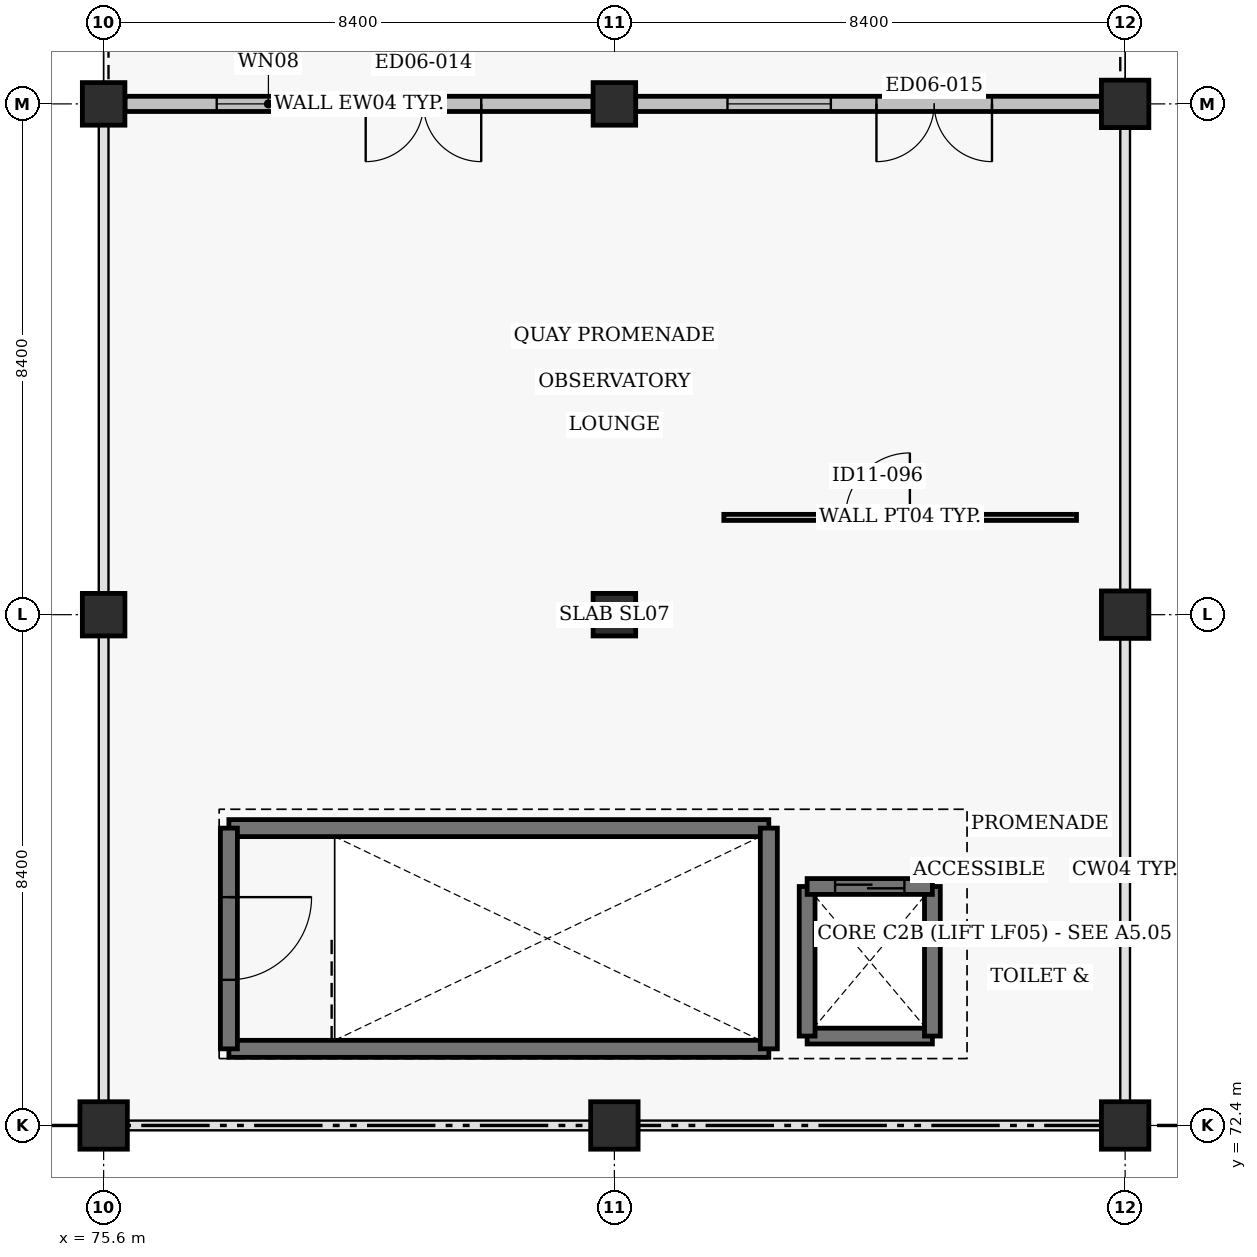
"""IFC4 building model, lengths in metres.
Left out: names, types, materials, properties, quantities, classifications, styles, units other than length and angle.
Written with IfcOpenShell. Run it as: python <this file> out.ifc"""

import sys

from ifc_helpers import new_model, si_unit, direction, frame, frame_2d, origin, origin_2d, place, context, subcontext, project, spatial, rectangle, circle, extrude, element, fill, save


model = new_model("IFC4")
c1 = context("Model", 3, precision=1e-05, world=origin(), true_north=direction((0.0, 1.0)))
c2 = subcontext(c1, "Body", "Model", "MODEL_VIEW")
j1 = project(units=[si_unit("LENGTHUNIT", "METRE"), si_unit("PLANEANGLEUNIT", "RADIAN")], contexts=[c1])
p1 = place(None, origin())
s1 = spatial("IfcSite", under=j1, at=p1, CompositionType="ELEMENT")
p2 = place(p1, origin())
s2 = spatial("IfcBuilding", under=s1, at=p2, CompositionType="ELEMENT")
p3 = place(p2, frame((0.0, 0.0, 9.6)))
s3 = spatial("IfcBuildingStorey", under=s2, at=p3, CompositionType="ELEMENT", Elevation=9.6)
p4 = place(p3, frame((75.6, 72.4, 0.0), z_axis=(0.0, 0.0, 1.0), x_axis=(1.0, 0.0, 0.0)))
e1 = element("IfcColumn", 1, at=p4, inside=s3, PredefinedType="COLUMN", context=c2, shape_type="SweptSolid", body=[
    extrude(circle(Radius=0.39, at=origin_2d()), origin(), (0.0, 0.0, 1.0), 3.52),
])
for number, where, z_axis, x_axis in (
    (2, (75.6, 80.8, 0.0), (0.0, 0.0, 1.0), (1.0, 0.0, 0.0)),
    (3, (75.6, 89.2, 0.0), (0.0, 0.0, 1.0), (1.0, 0.0, 0.0)),
):
    element("IfcColumn", number, at=place(p3, frame(where, z_axis=z_axis, x_axis=x_axis)), inside=s3, PredefinedType="COLUMN", context=c2, shape_type="SweptSolid", body=[
        extrude(rectangle(XDim=0.7, YDim=0.7, at=origin_2d()), origin(), (0.0, 0.0, 1.0), 3.52),
    ])
p5 = place(p3, frame((84.0, 72.4, 0.0), z_axis=(0.0, 0.0, 1.0), x_axis=(1.0, 0.0, 0.0)))
e4 = element("IfcColumn", 4, at=p5, inside=s3, PredefinedType="COLUMN", context=c2, shape_type="SweptSolid", body=[
    extrude(circle(Radius=0.39, at=origin_2d()), origin(), (0.0, 0.0, 1.0), 3.52),
])
for number, where, z_axis, x_axis in (
    (5, (84.0, 80.8, 0.0), (0.0, 0.0, 1.0), (1.0, 0.0, 0.0)),
    (6, (84.0, 89.2, 0.0), (0.0, 0.0, 1.0), (1.0, 0.0, 0.0)),
):
    element("IfcColumn", number, at=place(p3, frame(where, z_axis=z_axis, x_axis=x_axis)), inside=s3, PredefinedType="COLUMN", context=c2, shape_type="SweptSolid", body=[
        extrude(rectangle(XDim=0.7, YDim=0.7, at=origin_2d()), origin(), (0.0, 0.0, 1.0), 3.52),
    ])
for number, where, z_axis, x_axis in (
    (7, (92.4, 72.4, 0.0), (0.0, 0.0, 1.0), (1.0, 0.0, 0.0)),
    (8, (92.4, 80.8, 0.0), (0.0, 0.0, 1.0), (1.0, 0.0, 0.0)),
    (9, (92.4, 89.2, 0.0), (0.0, 0.0, 1.0), (1.0, 0.0, 0.0)),
):
    element("IfcColumn", number, at=place(p3, frame(where, z_axis=z_axis, x_axis=x_axis)), inside=s3, PredefinedType="COLUMN", context=c2, shape_type="SweptSolid", body=[
        extrude(circle(Radius=0.39, at=origin_2d()), origin(), (0.0, 0.0, 1.0), 3.52),
    ])
p6 = place(p3, frame((83.65, 89.2, 0.0), z_axis=(0.0, 0.0, 1.0), x_axis=(-1.0, 0.0, 0.0)))
e10 = element("IfcWall", 10, at=p6, inside=s3, PredefinedType="SOLIDWALL", context=c2, shape_type="SweptSolid", body=[
    extrude(rectangle(XDim=7.7, YDim=0.25, at=frame_2d((3.85, 0.0))), origin(), (0.0, 0.0, 1.0), 2.805),
])
p7 = place(p6, frame((1.84, 0.0, 0.0)))
e11 = element("IfcOpeningElement", 11, at=p7, cuts=e10, PredefinedType="OPENING", context=c2, shape_type="SweptSolid", body=[
    extrude(rectangle(XDim=1.9, YDim=2.15, at=frame_2d((0.95, 1.075))), frame((0.0, 0.135, 0.0), z_axis=(0.0, -1.0, 0.0), x_axis=(1.0, 0.0, 0.0)), (0.0, 0.0, 1.0), 0.27),
])
p8 = place(p6, frame((4.49, 0.0, 0.85)))
e12 = element("IfcOpeningElement", 12, at=p8, cuts=e10, PredefinedType="OPENING", context=c2, shape_type="SweptSolid", body=[
    extrude(rectangle(XDim=1.7, YDim=1.6, at=frame_2d((0.85, 0.8))), frame((0.0, 0.135, 0.0), z_axis=(0.0, -1.0, 0.0), x_axis=(1.0, 0.0, 0.0)), (0.0, 0.0, 1.0), 0.27),
])
p9 = place(p3, frame((92.01, 89.2, 0.0), z_axis=(0.0, 0.0, 1.0), x_axis=(-1.0, 0.0, 0.0)))
e13 = element("IfcWall", 13, at=p9, inside=s3, PredefinedType="SOLIDWALL", context=c2, shape_type="SweptSolid", body=[
    extrude(rectangle(XDim=7.66, YDim=0.25, at=frame_2d((3.83, 0.0))), origin(), (0.0, 0.0, 1.0), 2.805),
])
p10 = place(p9, frame((1.8, 0.0, 0.0)))
e14 = element("IfcOpeningElement", 14, at=p10, cuts=e13, PredefinedType="OPENING", context=c2, shape_type="SweptSolid", body=[
    extrude(rectangle(XDim=1.9, YDim=2.15, at=frame_2d((0.95, 1.075))), frame((0.0, 0.135, 0.0), z_axis=(0.0, -1.0, 0.0), x_axis=(1.0, 0.0, 0.0)), (0.0, 0.0, 1.0), 0.27),
])
p11 = place(p9, frame((4.45, 0.0, 0.85)))
e15 = element("IfcOpeningElement", 15, at=p11, cuts=e13, PredefinedType="OPENING", context=c2, shape_type="SweptSolid", body=[
    extrude(rectangle(XDim=1.7, YDim=1.6, at=frame_2d((0.85, 0.8))), frame((0.0, 0.135, 0.0), z_axis=(0.0, -1.0, 0.0), x_axis=(1.0, 0.0, 0.0)), (0.0, 0.0, 1.0), 0.27),
])
for number, where, z_axis, x_axis in (
    (16, (77.66, 73.66, 0.0), (0.0, 0.0, 1.0), (1.0, 0.0, 0.0)),
    (17, (77.66, 77.29, 0.0), (0.0, 0.0, 1.0), (1.0, 0.0, 0.0)),
):
    element("IfcWall", number, at=place(p3, frame(where, z_axis=z_axis, x_axis=x_axis)), inside=s3, PredefinedType="SHEAR", context=c2, shape_type="SweptSolid", body=[
        extrude(rectangle(XDim=8.88, YDim=0.28, at=frame_2d((4.44, 0.0))), origin(), (0.0, 0.0, 1.0), 2.84),
    ])
p12 = place(p3, frame((77.66, 77.29, 0.0), z_axis=(0.0, 0.0, 1.0), x_axis=(0.0, -1.0, 0.0)))
e18 = element("IfcWall", 18, at=p12, inside=s3, PredefinedType="SHEAR", context=c2, shape_type="SweptSolid", body=[
    extrude(rectangle(XDim=3.63, YDim=0.28, at=frame_2d((1.815, 0.0))), origin(), (0.0, 0.0, 1.0), 2.84),
])
p13 = place(p12, frame((1.135, 0.0, 0.0)))
e19 = element("IfcOpeningElement", 19, at=p13, cuts=e18, PredefinedType="OPENING", context=c2, shape_type="SweptSolid", body=[
    extrude(rectangle(XDim=1.36, YDim=2.15, at=frame_2d((0.68, 1.075))), frame((0.0, 0.15, 0.0), z_axis=(0.0, -1.0, 0.0), x_axis=(1.0, 0.0, 0.0)), (0.0, 0.0, 1.0), 0.3),
])
p14 = place(p3, frame((86.54, 73.66, 0.0), z_axis=(0.0, 0.0, 1.0), x_axis=(0.0, 1.0, 0.0)))
e20 = element("IfcWall", 20, at=p14, inside=s3, PredefinedType="SHEAR", context=c2, shape_type="SweptSolid", body=[
    extrude(rectangle(XDim=3.63, YDim=0.28, at=frame_2d((1.815, 0.0))), origin(), (0.0, 0.0, 1.0), 2.84),
])
p15 = place(p3, frame((87.17, 73.87, 0.0), z_axis=(0.0, 0.0, 1.0), x_axis=(1.0, 0.0, 0.0)))
e21 = element("IfcWall", 21, at=p15, inside=s3, PredefinedType="SHEAR", context=c2, shape_type="SweptSolid", body=[
    extrude(rectangle(XDim=2.06, YDim=0.26, at=frame_2d((1.03, 0.0))), origin(), (0.0, 0.0, 1.0), 2.84),
])
for number, where, z_axis, x_axis in (
    (22, (89.23, 73.87, 0.0), (0.0, 0.0, 1.0), (0.0, 1.0, 0.0)),
    (23, (87.17, 76.33, 0.0), (0.0, 0.0, 1.0), (0.0, -1.0, 0.0)),
):
    element("IfcWall", number, at=place(p3, frame(where, z_axis=z_axis, x_axis=x_axis)), inside=s3, PredefinedType="SHEAR", context=c2, shape_type="SweptSolid", body=[
        extrude(rectangle(XDim=2.46, YDim=0.26, at=frame_2d((1.23, 0.0))), origin(), (0.0, 0.0, 1.0), 2.84),
    ])
p16 = place(p3, frame((87.17, 76.33, 0.0), z_axis=(0.0, 0.0, 1.0), x_axis=(1.0, 0.0, 0.0)))
e24 = element("IfcWall", 24, at=p16, inside=s3, PredefinedType="SHEAR", context=c2, shape_type="SweptSolid", body=[
    extrude(rectangle(XDim=2.06, YDim=0.26, at=frame_2d((1.03, 0.0))), origin(), (0.0, 0.0, 1.0), 2.84),
])
p17 = place(p16, frame((0.46, 0.0, 0.0)))
e25 = element("IfcOpeningElement", 25, at=p17, cuts=e24, PredefinedType="OPENING", context=c2, shape_type="SweptSolid", body=[
    extrude(rectangle(XDim=1.14, YDim=2.14, at=frame_2d((0.57, 1.07))), frame((0.0, 0.14, 0.0), z_axis=(0.0, -1.0, 0.0), x_axis=(1.0, 0.0, 0.0)), (0.0, 0.0, 1.0), 0.28),
])
p18 = place(p3, frame((85.8, 82.4, 0.0), z_axis=(0.0, 0.0, 1.0), x_axis=(1.0, 0.0, 0.0)))
e26 = element("IfcWall", 26, at=p18, inside=s3, PredefinedType="PARTITIONING", context=c2, shape_type="SweptSolid", body=[
    extrude(rectangle(XDim=5.8, YDim=0.1, at=frame_2d((2.9, 0.0))), origin(), (0.0, 0.0, 1.0), 2.65),
])
p19 = place(p18, frame((2.0, 0.0, 0.0)))
e27 = element("IfcOpeningElement", 27, at=p19, cuts=e26, PredefinedType="OPENING", context=c2, shape_type="SweptSolid", body=[
    extrude(rectangle(XDim=1.06, YDim=2.1, at=frame_2d((0.53, 1.05))), frame((0.0, 0.06, 0.0), z_axis=(0.0, -1.0, 0.0), x_axis=(1.0, 0.0, 0.0)), (0.0, 0.0, 1.0), 0.12),
])
p20 = place(p7, origin())
e28 = element("IfcDoor", 28, at=p20, inside=s3, OperationType="DOUBLE_DOOR_SINGLE_SWING", PredefinedType="DOOR", context=c2, shape_type="SweptSolid", body=[
    extrude(rectangle(XDim=1.9, YDim=2.15, at=frame_2d((0.95, 1.075))), frame((0.0, 0.025, 0.0), z_axis=(0.0, -1.0, 0.0), x_axis=(1.0, 0.0, 0.0)), (0.0, 0.0, 1.0), 0.05),
])
fill(e11, e28)
p21 = place(p8, origin())
e29 = element("IfcWindow", 29, at=p21, inside=s3, PartitioningType="DOUBLE_PANEL_VERTICAL", PredefinedType="WINDOW", context=c2, shape_type="SweptSolid", body=[
    extrude(rectangle(XDim=1.7, YDim=1.6, at=frame_2d((0.85, 0.8))), frame((0.0, 0.03, 0.0), z_axis=(0.0, -1.0, 0.0), x_axis=(1.0, 0.0, 0.0)), (0.0, 0.0, 1.0), 0.06),
])
fill(e12, e29)
p22 = place(p10, origin())
e30 = element("IfcDoor", 30, at=p22, inside=s3, OperationType="DOUBLE_DOOR_SINGLE_SWING", PredefinedType="DOOR", context=c2, shape_type="SweptSolid", body=[
    extrude(rectangle(XDim=1.9, YDim=2.15, at=frame_2d((0.95, 1.075))), frame((0.0, 0.025, 0.0), z_axis=(0.0, -1.0, 0.0), x_axis=(1.0, 0.0, 0.0)), (0.0, 0.0, 1.0), 0.05),
])
fill(e14, e30)
p23 = place(p11, origin())
e31 = element("IfcWindow", 31, at=p23, inside=s3, PartitioningType="DOUBLE_PANEL_VERTICAL", PredefinedType="WINDOW", context=c2, shape_type="SweptSolid", body=[
    extrude(rectangle(XDim=1.7, YDim=1.6, at=frame_2d((0.85, 0.8))), frame((0.0, 0.03, 0.0), z_axis=(0.0, -1.0, 0.0), x_axis=(1.0, 0.0, 0.0)), (0.0, 0.0, 1.0), 0.06),
])
fill(e15, e31)
p24 = place(p13, origin())
e32 = element("IfcDoor", 32, at=p24, inside=s3, OperationType="SINGLE_SWING_LEFT", PredefinedType="DOOR", context=c2, shape_type="SweptSolid", body=[
    extrude(rectangle(XDim=1.36, YDim=2.15, at=frame_2d((0.68, 1.075))), frame((0.0, 0.025, 0.0), z_axis=(0.0, -1.0, 0.0), x_axis=(1.0, 0.0, 0.0)), (0.0, 0.0, 1.0), 0.05),
])
fill(e19, e32)
p25 = place(p17, origin())
e33 = element("IfcDoor", 33, at=p25, inside=s3, OperationType="DOUBLE_DOOR_SLIDING", PredefinedType="DOOR", context=c2, shape_type="SweptSolid", body=[
    extrude(rectangle(XDim=1.14, YDim=2.14, at=frame_2d((0.57, 1.07))), frame((0.0, 0.025, 0.0), z_axis=(0.0, -1.0, 0.0), x_axis=(1.0, 0.0, 0.0)), (0.0, 0.0, 1.0), 0.05),
])
fill(e25, e33)
p26 = place(p19, origin())
e34 = element("IfcDoor", 34, at=p26, inside=s3, OperationType="SINGLE_SWING_RIGHT", PredefinedType="DOOR", context=c2, shape_type="SweptSolid", body=[
    extrude(rectangle(XDim=1.06, YDim=2.1, at=frame_2d((0.53, 1.05))), frame((0.0, 0.025, 0.0), z_axis=(0.0, -1.0, 0.0), x_axis=(1.0, 0.0, 0.0)), (0.0, 0.0, 1.0), 0.05),
])
fill(e27, e34)
save(model, sys.argv[1])
